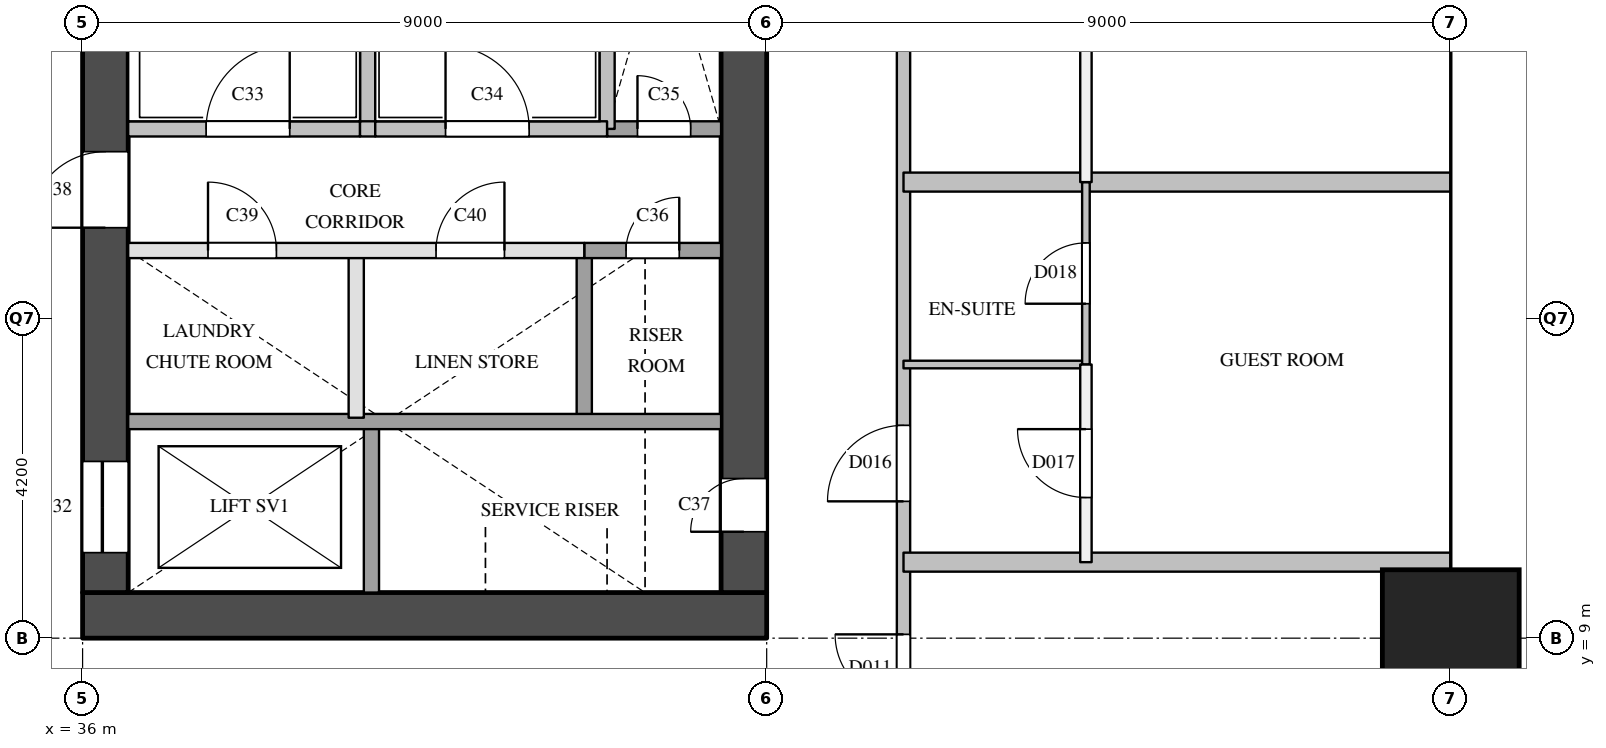
"""IFC4 building model, lengths in metres.
Left out: names, types, materials, properties, quantities, classifications, styles, units other than length and angle.
Written with IfcOpenShell. Run it as: python <this file> out.ifc"""

import sys

from ifc_helpers import new_model, si_unit, direction, frame, frame_2d, origin, origin_2d, place, context, subcontext, project, spatial, rectangle, extrude, element, fill, save


model = new_model("IFC4")
c1 = context("Model", 3, precision=1e-05, world=origin(), true_north=direction((0.0, 1.0)))
c2 = subcontext(c1, "Body", "Model", "MODEL_VIEW")
j1 = project(units=[si_unit("LENGTHUNIT", "METRE"), si_unit("PLANEANGLEUNIT", "RADIAN")], contexts=[c1])
p1 = place(None, origin())
s1 = spatial("IfcSite", under=j1, at=p1, CompositionType="ELEMENT")
p2 = place(p1, origin())
s2 = spatial("IfcBuilding", under=s1, at=p2, CompositionType="ELEMENT")
p3 = place(p2, frame((0.0, 0.0, 72.8)))
s3 = spatial("IfcBuildingStorey", under=s2, at=p3, CompositionType="ELEMENT", Elevation=72.8)
p4 = place(p3, frame((54.0, 9.0, 0.0), z_axis=(0.0, 0.0, 1.0), x_axis=(1.0, 0.0, 0.0)))
e1 = element("IfcColumn", 1, at=p4, inside=s3, PredefinedType="COLUMN", context=c2, shape_type="SweptSolid", body=[
    extrude(rectangle(XDim=1.8, YDim=1.8, at=origin_2d()), origin(), (0.0, 0.0, 1.0), 5.0),
])
p5 = place(p3, frame((36.0, 9.3, 0.0), z_axis=(0.0, 0.0, 1.0), x_axis=(1.0, 0.0, 0.0)))
e2 = element("IfcWall", 2, at=p5, inside=s3, PredefinedType="SHEAR", context=c2, shape_type="SweptSolid", body=[
    extrude(rectangle(XDim=9.0, YDim=0.6, at=frame_2d((4.5, 0.0))), origin(), (0.0, 0.0, 1.0), 4.7),
])
p6 = place(p3, frame((36.3, 9.6, 0.0), z_axis=(0.0, 0.0, 1.0), x_axis=(0.0, 1.0, 0.0)))
e3 = element("IfcWall", 3, at=p6, inside=s3, PredefinedType="SHEAR", context=c2, shape_type="SweptSolid", body=[
    extrude(rectangle(XDim=12.3, YDim=0.6, at=frame_2d((6.15, 0.0))), origin(), (0.0, 0.0, 1.0), 4.7),
])
p7 = place(p6, frame((0.525, 0.0, 0.0)))
e4 = element("IfcOpeningElement", 4, at=p7, cuts=e3, PredefinedType="OPENING", context=c2, shape_type="SweptSolid", body=[
    extrude(rectangle(XDim=1.2, YDim=2.1, at=frame_2d((0.6, 1.05))), frame((0.0, 0.31, 0.0), z_axis=(0.0, -1.0, 0.0), x_axis=(1.0, 0.0, 0.0)), (0.0, 0.0, 1.0), 0.62),
])
p8 = place(p6, frame((4.8, 0.0, 0.0)))
e5 = element("IfcOpeningElement", 5, at=p8, cuts=e3, PredefinedType="OPENING", context=c2, shape_type="SweptSolid", body=[
    extrude(rectangle(XDim=1.0, YDim=2.1, at=frame_2d((0.5, 1.05))), frame((0.0, 0.31, 0.0), z_axis=(0.0, -1.0, 0.0), x_axis=(1.0, 0.0, 0.0)), (0.0, 0.0, 1.0), 0.62),
])
p9 = place(p3, frame((44.7, 9.6, 0.0), z_axis=(0.0, 0.0, 1.0), x_axis=(0.0, 1.0, 0.0)))
e6 = element("IfcWall", 6, at=p9, inside=s3, PredefinedType="SHEAR", context=c2, shape_type="SweptSolid", body=[
    extrude(rectangle(XDim=12.3, YDim=0.6, at=frame_2d((6.15, 0.0))), origin(), (0.0, 0.0, 1.0), 4.7),
])
p10 = place(p9, frame((0.8, 0.0, 0.0)))
e7 = element("IfcOpeningElement", 7, at=p10, cuts=e6, PredefinedType="OPENING", context=c2, shape_type="SweptSolid", body=[
    extrude(rectangle(XDim=0.7, YDim=2.1, at=frame_2d((0.35, 1.05))), frame((0.0, 0.31, 0.0), z_axis=(0.0, -1.0, 0.0), x_axis=(1.0, 0.0, 0.0)), (0.0, 0.0, 1.0), 0.62),
])
p11 = place(p3, frame((39.6, 11.9, 0.0), z_axis=(0.0, 0.0, 1.0), x_axis=(0.0, 1.0, 0.0)))
e8 = element("IfcWall", 8, at=p11, inside=s3, PredefinedType="PARTITIONING", context=c2, shape_type="SweptSolid", body=[
    extrude(rectangle(XDim=2.2, YDim=0.2, at=frame_2d((1.1, 0.0))), origin(), (0.0, 0.0, 1.0), 4.7),
])
p12 = place(p3, frame((39.75, 15.7, 0.0), z_axis=(0.0, 0.0, 1.0), x_axis=(0.0, 1.0, 0.0)))
e9 = element("IfcWall", 9, at=p12, inside=s3, PredefinedType="SOLIDWALL", context=c2, shape_type="SweptSolid", body=[
    extrude(rectangle(XDim=1.5, YDim=0.2, at=frame_2d((0.75, 0.0))), origin(), (0.0, 0.0, 1.0), 4.7),
])
p13 = place(p3, frame((39.8, 9.6, 0.0), z_axis=(0.0, 0.0, 1.0), x_axis=(0.0, 1.0, 0.0)))
e10 = element("IfcWall", 10, at=p13, inside=s3, PredefinedType="SOLIDWALL", context=c2, shape_type="SweptSolid", body=[
    extrude(rectangle(XDim=2.3, YDim=0.2, at=frame_2d((1.15, 0.0))), origin(), (0.0, 0.0, 1.0), 4.7),
])
p14 = place(p3, frame((42.6, 11.9, 0.0), z_axis=(0.0, 0.0, 1.0), x_axis=(0.0, 1.0, 0.0)))
e11 = element("IfcWall", 11, at=p14, inside=s3, PredefinedType="SOLIDWALL", context=c2, shape_type="SweptSolid", body=[
    extrude(rectangle(XDim=2.2, YDim=0.2, at=frame_2d((1.1, 0.0))), origin(), (0.0, 0.0, 1.0), 4.7),
])
p15 = place(p3, frame((42.9, 15.7, 0.0), z_axis=(0.0, 0.0, 1.0), x_axis=(0.0, 1.0, 0.0)))
e12 = element("IfcWall", 12, at=p15, inside=s3, PredefinedType="SOLIDWALL", context=c2, shape_type="SweptSolid", body=[
    extrude(rectangle(XDim=1.5, YDim=0.2, at=frame_2d((0.75, 0.0))), origin(), (0.0, 0.0, 1.0), 4.7),
])
p16 = place(p3, frame((36.6, 11.85, 0.0), z_axis=(0.0, 0.0, 1.0), x_axis=(1.0, 0.0, 0.0)))
e13 = element("IfcWall", 13, at=p16, inside=s3, PredefinedType="SOLIDWALL", context=c2, shape_type="SweptSolid", body=[
    extrude(rectangle(XDim=7.8, YDim=0.2, at=frame_2d((3.9, 0.0))), origin(), (0.0, 0.0, 1.0), 4.7),
])
p17 = place(p3, frame((36.6, 14.1, 0.0), z_axis=(0.0, 0.0, 1.0), x_axis=(1.0, 0.0, 0.0)))
e14 = element("IfcWall", 14, at=p17, inside=s3, PredefinedType="PARTITIONING", context=c2, shape_type="SweptSolid", body=[
    extrude(rectangle(XDim=6.0, YDim=0.2, at=frame_2d((3.0, 0.0))), origin(), (0.0, 0.0, 1.0), 4.7),
])
p18 = place(p17, frame((1.05, 0.0, 0.0)))
e15 = element("IfcOpeningElement", 15, at=p18, cuts=e14, PredefinedType="OPENING", context=c2, shape_type="SweptSolid", body=[
    extrude(rectangle(XDim=0.9, YDim=2.1, at=frame_2d((0.45, 1.05))), frame((0.0, 0.11, 0.0), z_axis=(0.0, -1.0, 0.0), x_axis=(1.0, 0.0, 0.0)), (0.0, 0.0, 1.0), 0.22),
])
p19 = place(p17, frame((4.05, 0.0, 0.0)))
e16 = element("IfcOpeningElement", 16, at=p19, cuts=e14, PredefinedType="OPENING", context=c2, shape_type="SweptSolid", body=[
    extrude(rectangle(XDim=0.9, YDim=2.1, at=frame_2d((0.45, 1.05))), frame((0.0, 0.11, 0.0), z_axis=(0.0, -1.0, 0.0), x_axis=(1.0, 0.0, 0.0)), (0.0, 0.0, 1.0), 0.22),
])
p20 = place(p3, frame((42.6, 14.1, 0.0), z_axis=(0.0, 0.0, 1.0), x_axis=(1.0, 0.0, 0.0)))
e17 = element("IfcWall", 17, at=p20, inside=s3, PredefinedType="SOLIDWALL", context=c2, shape_type="SweptSolid", body=[
    extrude(rectangle(XDim=1.8, YDim=0.2, at=frame_2d((0.9, 0.0))), origin(), (0.0, 0.0, 1.0), 4.7),
])
p21 = place(p20, frame((0.55, 0.0, 0.0)))
e18 = element("IfcOpeningElement", 18, at=p21, cuts=e17, PredefinedType="OPENING", context=c2, shape_type="SweptSolid", body=[
    extrude(rectangle(XDim=0.7, YDim=2.1, at=frame_2d((0.35, 1.05))), frame((0.0, 0.11, 0.0), z_axis=(0.0, -1.0, 0.0), x_axis=(1.0, 0.0, 0.0)), (0.0, 0.0, 1.0), 0.22),
])
p22 = place(p3, frame((42.9, 15.7, 0.0), z_axis=(0.0, 0.0, 1.0), x_axis=(1.0, 0.0, 0.0)))
e19 = element("IfcWall", 19, at=p22, inside=s3, PredefinedType="SOLIDWALL", context=c2, shape_type="SweptSolid", body=[
    extrude(rectangle(XDim=1.5, YDim=0.2, at=frame_2d((0.75, 0.0))), origin(), (0.0, 0.0, 1.0), 4.7),
])
p23 = place(p22, frame((0.4, 0.0, 0.0)))
e20 = element("IfcOpeningElement", 20, at=p23, cuts=e19, PredefinedType="OPENING", context=c2, shape_type="SweptSolid", body=[
    extrude(rectangle(XDim=0.7, YDim=2.1, at=frame_2d((0.35, 1.05))), frame((0.0, 0.11, 0.0), z_axis=(0.0, -1.0, 0.0), x_axis=(1.0, 0.0, 0.0)), (0.0, 0.0, 1.0), 0.22),
])
p24 = place(p3, frame((36.6, 15.7, 0.0), z_axis=(0.0, 0.0, 1.0), x_axis=(1.0, 0.0, 0.0)))
e21 = element("IfcWall", 21, at=p24, inside=s3, PredefinedType="SOLIDWALL", context=c2, shape_type="SweptSolid", body=[
    extrude(rectangle(XDim=3.05, YDim=0.2, at=frame_2d((1.525, 0.0))), origin(), (0.0, 0.0, 1.0), 4.7),
])
p25 = place(p24, frame((1.025, 0.0, 0.0)))
e22 = element("IfcOpeningElement", 22, at=p25, cuts=e21, PredefinedType="OPENING", context=c2, shape_type="SweptSolid", body=[
    extrude(rectangle(XDim=1.1, YDim=2.1, at=frame_2d((0.55, 1.05))), frame((0.0, 0.11, 0.0), z_axis=(0.0, -1.0, 0.0), x_axis=(1.0, 0.0, 0.0)), (0.0, 0.0, 1.0), 0.22),
])
p26 = place(p3, frame((39.65, 15.7, 0.0), z_axis=(0.0, 0.0, 1.0), x_axis=(1.0, 0.0, 0.0)))
e23 = element("IfcWall", 23, at=p26, inside=s3, PredefinedType="SOLIDWALL", context=c2, shape_type="SweptSolid", body=[
    extrude(rectangle(XDim=0.2, YDim=0.2, at=frame_2d((0.1, 0.0))), origin(), (0.0, 0.0, 1.0), 4.7),
])
p27 = place(p3, frame((39.85, 15.7, 0.0), z_axis=(0.0, 0.0, 1.0), x_axis=(1.0, 0.0, 0.0)))
e24 = element("IfcWall", 24, at=p27, inside=s3, PredefinedType="SOLIDWALL", context=c2, shape_type="SweptSolid", body=[
    extrude(rectangle(XDim=3.05, YDim=0.2, at=frame_2d((1.525, 0.0))), origin(), (0.0, 0.0, 1.0), 4.7),
])
p28 = place(p27, frame((0.925, 0.0, 0.0)))
e25 = element("IfcOpeningElement", 25, at=p28, cuts=e24, PredefinedType="OPENING", context=c2, shape_type="SweptSolid", body=[
    extrude(rectangle(XDim=1.1, YDim=2.1, at=frame_2d((0.55, 1.05))), frame((0.0, 0.11, 0.0), z_axis=(0.0, -1.0, 0.0), x_axis=(1.0, 0.0, 0.0)), (0.0, 0.0, 1.0), 0.22),
])
p29 = place(p3, frame((46.8, 7.2, 0.0), z_axis=(0.0, 0.0, 1.0), x_axis=(0.0, 1.0, 0.0)))
e26 = element("IfcWall", 26, at=p29, inside=s3, PredefinedType="PARTITIONING", context=c2, shape_type="SweptSolid", body=[
    extrude(rectangle(XDim=16.49, YDim=0.175, at=frame_2d((8.245, 0.0))), origin(), (0.0, 0.0, 1.0), 4.7),
])
p30 = place(p29, frame((0.95, 0.0, 0.0)))
e27 = element("IfcOpeningElement", 27, at=p30, cuts=e26, PredefinedType="OPENING", context=c2, shape_type="SweptSolid", body=[
    extrude(rectangle(XDim=0.9, YDim=2.1, at=frame_2d((0.45, 1.05))), frame((0.0, 0.097, 0.0), z_axis=(0.0, -1.0, 0.0), x_axis=(1.0, 0.0, 0.0)), (0.0, 0.0, 1.0), 0.195),
])
p31 = place(p29, frame((3.6, 0.0, 0.0)))
e28 = element("IfcOpeningElement", 28, at=p31, cuts=e26, PredefinedType="OPENING", context=c2, shape_type="SweptSolid", body=[
    extrude(rectangle(XDim=1.0, YDim=2.1, at=frame_2d((0.5, 1.05))), frame((0.0, 0.097, 0.0), z_axis=(0.0, -1.0, 0.0), x_axis=(1.0, 0.0, 0.0)), (0.0, 0.0, 1.0), 0.195),
])
p32 = place(p29, frame((11.1, 0.0, 0.0)))
e29 = element("IfcOpeningElement", 29, at=p32, cuts=e26, PredefinedType="OPENING", context=c2, shape_type="SweptSolid", body=[
    extrude(rectangle(XDim=1.0, YDim=2.1, at=frame_2d((0.5, 1.05))), frame((0.0, 0.097, 0.0), z_axis=(0.0, -1.0, 0.0), x_axis=(1.0, 0.0, 0.0)), (0.0, 0.0, 1.0), 0.195),
])
p33 = place(p3, frame((49.2, 10.0, 0.0), z_axis=(0.0, 0.0, 1.0), x_axis=(0.0, 1.0, 0.0)))
e30 = element("IfcWall", 30, at=p33, inside=s3, PredefinedType="PARTITIONING", context=c2, shape_type="SweptSolid", body=[
    extrude(rectangle(XDim=2.6, YDim=0.15, at=frame_2d((1.3, 0.0))), origin(), (0.0, 0.0, 1.0), 4.7),
])
p34 = place(p33, frame((0.85, 0.0, 0.0)))
e31 = element("IfcOpeningElement", 31, at=p34, cuts=e30, PredefinedType="OPENING", context=c2, shape_type="SweptSolid", body=[
    extrude(rectangle(XDim=0.9, YDim=2.1, at=frame_2d((0.45, 1.05))), frame((0.0, 0.085, 0.0), z_axis=(0.0, -1.0, 0.0), x_axis=(1.0, 0.0, 0.0)), (0.0, 0.0, 1.0), 0.17),
])
p35 = place(p3, frame((49.2, 15.0, 0.0), z_axis=(0.0, 0.0, 1.0), x_axis=(0.0, 1.0, 0.0)))
e32 = element("IfcWall", 32, at=p35, inside=s3, PredefinedType="PARTITIONING", context=c2, shape_type="SweptSolid", body=[
    extrude(rectangle(XDim=7.6, YDim=0.15, at=frame_2d((3.8, 0.0))), origin(), (0.0, 0.0, 1.0), 4.7),
])
p36 = place(p35, frame((3.35, 0.0, 0.0)))
e33 = element("IfcOpeningElement", 33, at=p36, cuts=e32, PredefinedType="OPENING", context=c2, shape_type="SweptSolid", body=[
    extrude(rectangle(XDim=0.9, YDim=2.1, at=frame_2d((0.45, 1.05))), frame((0.0, 0.085, 0.0), z_axis=(0.0, -1.0, 0.0), x_axis=(1.0, 0.0, 0.0)), (0.0, 0.0, 1.0), 0.17),
])
for number, where, z_axis, x_axis in (
    (34, (46.8, 10.0, 0.0), (0.0, 0.0, 1.0), (1.0, 0.0, 0.0)),
    (35, (46.8, 15.0, 0.0), (0.0, 0.0, 1.0), (1.0, 0.0, 0.0)),
):
    element("IfcWall", number, at=place(p3, frame(where, z_axis=z_axis, x_axis=x_axis)), inside=s3, PredefinedType="PARTITIONING", context=c2, shape_type="SweptSolid", body=[
        extrude(rectangle(XDim=7.2, YDim=0.25, at=frame_2d((3.6, 0.0))), origin(), (0.0, 0.0, 1.0), 3.7),
    ])
p37 = place(p3, frame((46.8, 12.6, 0.0), z_axis=(0.0, 0.0, 1.0), x_axis=(1.0, 0.0, 0.0)))
e36 = element("IfcWall", 36, at=p37, inside=s3, PredefinedType="PARTITIONING", context=c2, shape_type="SweptSolid", body=[
    extrude(rectangle(XDim=2.4, YDim=0.1, at=frame_2d((1.2, 0.0))), origin(), (0.0, 0.0, 1.0), 4.7),
])
p38 = place(p3, frame((49.2, 12.6, 0.0), z_axis=(0.0, 0.0, 1.0), x_axis=(0.0, 1.0, 0.0)))
e37 = element("IfcWall", 37, at=p38, inside=s3, PredefinedType="PARTITIONING", context=c2, shape_type="SweptSolid", body=[
    extrude(rectangle(XDim=2.4, YDim=0.1, at=frame_2d((1.2, 0.0))), origin(), (0.0, 0.0, 1.0), 4.7),
])
p39 = place(p38, frame((0.8, 0.0, 0.0)))
e38 = element("IfcOpeningElement", 38, at=p39, cuts=e37, PredefinedType="OPENING", context=c2, shape_type="SweptSolid", body=[
    extrude(rectangle(XDim=0.8, YDim=2.1, at=frame_2d((0.4, 1.05))), frame((0.0, 0.06, 0.0), z_axis=(0.0, -1.0, 0.0), x_axis=(1.0, 0.0, 0.0)), (0.0, 0.0, 1.0), 0.12),
])
p40 = place(p7, origin())
e39 = element("IfcDoor", 39, at=p40, inside=s3, OperationType="SLIDING_TO_LEFT", PredefinedType="DOOR", context=c2, shape_type="SweptSolid", body=[
    extrude(rectangle(XDim=1.2, YDim=2.1, at=frame_2d((0.6, 1.05))), frame((0.0, 0.025, 0.0), z_axis=(0.0, -1.0, 0.0), x_axis=(1.0, 0.0, 0.0)), (0.0, 0.0, 1.0), 0.05),
])
fill(e4, e39)
p41 = place(p25, origin())
e40 = element("IfcDoor", 40, at=p41, inside=s3, OperationType="SINGLE_SWING_RIGHT", PredefinedType="DOOR", context=c2, shape_type="SweptSolid", body=[
    extrude(rectangle(XDim=1.1, YDim=2.1, at=frame_2d((0.55, 1.05))), frame((0.0, 0.025, 0.0), z_axis=(0.0, -1.0, 0.0), x_axis=(1.0, 0.0, 0.0)), (0.0, 0.0, 1.0), 0.05),
])
fill(e22, e40)
p42 = place(p28, origin())
e41 = element("IfcDoor", 41, at=p42, inside=s3, OperationType="SINGLE_SWING_LEFT", PredefinedType="DOOR", context=c2, shape_type="SweptSolid", body=[
    extrude(rectangle(XDim=1.1, YDim=2.1, at=frame_2d((0.55, 1.05))), frame((0.0, 0.025, 0.0), z_axis=(0.0, -1.0, 0.0), x_axis=(1.0, 0.0, 0.0)), (0.0, 0.0, 1.0), 0.05),
])
fill(e25, e41)
p43 = place(p23, origin())
e42 = element("IfcDoor", 42, at=p43, inside=s3, OperationType="SINGLE_SWING_LEFT", PredefinedType="DOOR", context=c2, shape_type="SweptSolid", body=[
    extrude(rectangle(XDim=0.7, YDim=2.1, at=frame_2d((0.35, 1.05))), frame((0.0, 0.025, 0.0), z_axis=(0.0, -1.0, 0.0), x_axis=(1.0, 0.0, 0.0)), (0.0, 0.0, 1.0), 0.05),
])
fill(e20, e42)
p44 = place(p21, origin())
e43 = element("IfcDoor", 43, at=p44, inside=s3, OperationType="SINGLE_SWING_RIGHT", PredefinedType="DOOR", context=c2, shape_type="SweptSolid", body=[
    extrude(rectangle(XDim=0.7, YDim=2.1, at=frame_2d((0.35, 1.05))), frame((0.0, 0.025, 0.0), z_axis=(0.0, -1.0, 0.0), x_axis=(1.0, 0.0, 0.0)), (0.0, 0.0, 1.0), 0.05),
])
fill(e18, e43)
p45 = place(p10, origin())
e44 = element("IfcDoor", 44, at=p45, inside=s3, OperationType="SINGLE_SWING_LEFT", PredefinedType="DOOR", context=c2, shape_type="SweptSolid", body=[
    extrude(rectangle(XDim=0.7, YDim=2.1, at=frame_2d((0.35, 1.05))), frame((0.0, 0.025, 0.0), z_axis=(0.0, -1.0, 0.0), x_axis=(1.0, 0.0, 0.0)), (0.0, 0.0, 1.0), 0.05),
])
fill(e7, e44)
p46 = place(p8, origin())
e45 = element("IfcDoor", 45, at=p46, inside=s3, OperationType="SINGLE_SWING_LEFT", PredefinedType="DOOR", context=c2, shape_type="SweptSolid", body=[
    extrude(rectangle(XDim=1.0, YDim=2.1, at=frame_2d((0.5, 1.05))), frame((0.0, 0.025, 0.0), z_axis=(0.0, -1.0, 0.0), x_axis=(1.0, 0.0, 0.0)), (0.0, 0.0, 1.0), 0.05),
])
fill(e5, e45)
p47 = place(p18, origin())
e46 = element("IfcDoor", 46, at=p47, inside=s3, OperationType="SINGLE_SWING_LEFT", PredefinedType="DOOR", context=c2, shape_type="SweptSolid", body=[
    extrude(rectangle(XDim=0.9, YDim=2.1, at=frame_2d((0.45, 1.05))), frame((0.0, 0.025, 0.0), z_axis=(0.0, -1.0, 0.0), x_axis=(1.0, 0.0, 0.0)), (0.0, 0.0, 1.0), 0.05),
])
fill(e15, e46)
p48 = place(p19, origin())
e47 = element("IfcDoor", 47, at=p48, inside=s3, OperationType="SINGLE_SWING_RIGHT", PredefinedType="DOOR", context=c2, shape_type="SweptSolid", body=[
    extrude(rectangle(XDim=0.9, YDim=2.1, at=frame_2d((0.45, 1.05))), frame((0.0, 0.025, 0.0), z_axis=(0.0, -1.0, 0.0), x_axis=(1.0, 0.0, 0.0)), (0.0, 0.0, 1.0), 0.05),
])
fill(e16, e47)
p49 = place(p30, origin())
e48 = element("IfcDoor", 48, at=p49, inside=s3, OperationType="SINGLE_SWING_RIGHT", PredefinedType="DOOR", context=c2, shape_type="SweptSolid", body=[
    extrude(rectangle(XDim=0.9, YDim=2.1, at=frame_2d((0.45, 1.05))), frame((0.0, 0.025, 0.0), z_axis=(0.0, -1.0, 0.0), x_axis=(1.0, 0.0, 0.0)), (0.0, 0.0, 1.0), 0.05),
])
fill(e27, e48)
p50 = place(p31, origin())
e49 = element("IfcDoor", 49, at=p50, inside=s3, OperationType="SINGLE_SWING_LEFT", PredefinedType="DOOR", context=c2, shape_type="SweptSolid", body=[
    extrude(rectangle(XDim=1.0, YDim=2.1, at=frame_2d((0.5, 1.05))), frame((0.0, 0.025, 0.0), z_axis=(0.0, -1.0, 0.0), x_axis=(1.0, 0.0, 0.0)), (0.0, 0.0, 1.0), 0.05),
])
fill(e28, e49)
p51 = place(p34, origin())
e50 = element("IfcDoor", 50, at=p51, inside=s3, OperationType="SINGLE_SWING_RIGHT", PredefinedType="DOOR", context=c2, shape_type="SweptSolid", body=[
    extrude(rectangle(XDim=0.9, YDim=2.1, at=frame_2d((0.45, 1.05))), frame((0.0, 0.025, 0.0), z_axis=(0.0, -1.0, 0.0), x_axis=(1.0, 0.0, 0.0)), (0.0, 0.0, 1.0), 0.05),
])
fill(e31, e50)
p52 = place(p39, origin())
e51 = element("IfcDoor", 51, at=p52, inside=s3, OperationType="SINGLE_SWING_LEFT", PredefinedType="DOOR", context=c2, shape_type="SweptSolid", body=[
    extrude(rectangle(XDim=0.8, YDim=2.1, at=frame_2d((0.4, 1.05))), frame((0.0, 0.025, 0.0), z_axis=(0.0, -1.0, 0.0), x_axis=(1.0, 0.0, 0.0)), (0.0, 0.0, 1.0), 0.05),
])
fill(e38, e51)
save(model, sys.argv[1])
